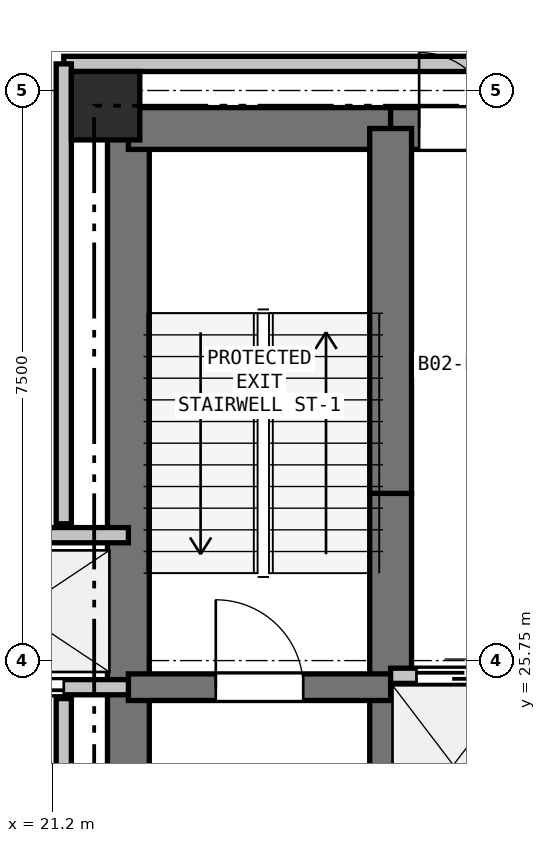
"""IFC4 building model, lengths in metres.
Left out: names, types, materials, properties, quantities, classifications, styles, units other than length and angle.
Written with IfcOpenShell. Run it as: python <this file> out.ifc"""

import sys

from ifc_helpers import new_model, si_unit, direction, frame, frame_2d, origin, origin_2d, place, context, subcontext, project, spatial, rectangle, extrude, element, fill, save


model = new_model("IFC4")
c1 = context("Model", 3, precision=1e-05, world=origin(), true_north=direction((0.0, 1.0)))
c2 = subcontext(c1, "Body", "Model", "MODEL_VIEW")
j1 = project(units=[si_unit("LENGTHUNIT", "METRE"), si_unit("PLANEANGLEUNIT", "RADIAN")], contexts=[c1])
p1 = place(None, origin())
s1 = spatial("IfcSite", under=j1, at=p1, CompositionType="ELEMENT")
p2 = place(p1, origin())
s2 = spatial("IfcBuilding", under=s1, at=p2, CompositionType="ELEMENT")
p3 = place(p2, frame((0.0, 0.0, -9.0)))
s3 = spatial("IfcBuildingStorey", under=s2, at=p3, CompositionType="ELEMENT", Elevation=-9.0)
p4 = place(p3, frame((21.9, 33.05, 0.0), z_axis=(0.0, 0.0, 1.0), x_axis=(1.0, 0.0, 0.0)))
e1 = element("IfcColumn", 1, at=p4, inside=s3, PredefinedType="COLUMN", context=c2, shape_type="SweptSolid", body=[
    extrude(rectangle(XDim=0.9, YDim=0.9, at=origin_2d()), origin(), (0.0, 0.0, 1.0), 4.5),
])
p5 = place(p3, frame((22.2, 20.75, 0.0), z_axis=(0.0, 0.0, 1.0), x_axis=(0.0, 1.0, 0.0)))
e2 = element("IfcWall", 2, at=p5, inside=s3, PredefinedType="SHEAR", context=c2, shape_type="SweptSolid", body=[
    extrude(rectangle(XDim=4.65, YDim=0.55, at=frame_2d((2.325, 0.0))), origin(), (0.0, 0.0, 1.0), 4.2),
])
p6 = place(p3, frame((22.2, 25.4, 0.0), z_axis=(0.0, 0.0, 1.0), x_axis=(0.0, 1.0, 0.0)))
e3 = element("IfcWall", 3, at=p6, inside=s3, PredefinedType="SHEAR", context=c2, shape_type="SweptSolid", body=[
    extrude(rectangle(XDim=7.35, YDim=0.55, at=frame_2d((3.675, 0.0))), origin(), (0.0, 0.0, 1.0), 4.2),
])
p7 = place(p3, frame((22.2, 32.75, 0.0), z_axis=(0.0, 0.0, 1.0), x_axis=(1.0, 0.0, 0.0)))
e4 = element("IfcWall", 4, at=p7, inside=s3, PredefinedType="SHEAR", context=c2, shape_type="SweptSolid", body=[
    extrude(rectangle(XDim=3.45, YDim=0.55, at=frame_2d((1.725, 0.0))), origin(), (0.0, 0.0, 1.0), 4.2),
])
p8 = place(p3, frame((25.65, 32.75, 0.0), z_axis=(0.0, 0.0, 1.0), x_axis=(1.0, 0.0, 0.0)))
e5 = element("IfcWall", 5, at=p8, inside=s3, PredefinedType="SHEAR", context=c2, shape_type="SweptSolid", body=[
    extrude(rectangle(XDim=1.75, YDim=0.55, at=frame_2d((0.875, 0.0))), origin(), (0.0, 0.0, 1.0), 4.2),
])
p9 = place(p8, frame((0.375, 0.0, 0.0)))
e6 = element("IfcOpeningElement", 6, at=p9, cuts=e5, PredefinedType="OPENING", context=c2, shape_type="SweptSolid", body=[
    extrude(rectangle(XDim=1.0, YDim=2.15, at=frame_2d((0.5, 1.075))), frame((0.0, 0.285, 0.0), z_axis=(0.0, -1.0, 0.0), x_axis=(1.0, 0.0, 0.0)), (0.0, 0.0, 1.0), 0.57),
])
p10 = place(p3, frame((25.65, 22.75, 0.0), z_axis=(0.0, 0.0, 1.0), x_axis=(0.0, 1.0, 0.0)))
e7 = element("IfcWall", 7, at=p10, inside=s3, PredefinedType="SHEAR", context=c2, shape_type="SweptSolid", body=[
    extrude(rectangle(XDim=2.8, YDim=0.55, at=frame_2d((1.4, 0.0))), origin(), (0.0, 0.0, 1.0), 4.2),
])
p11 = place(p3, frame((25.65, 25.55, 0.0), z_axis=(0.0, 0.0, 1.0), x_axis=(0.0, 1.0, 0.0)))
e8 = element("IfcWall", 8, at=p11, inside=s3, PredefinedType="SHEAR", context=c2, shape_type="SweptSolid", body=[
    extrude(rectangle(XDim=2.4, YDim=0.55, at=frame_2d((1.2, 0.0))), origin(), (0.0, 0.0, 1.0), 4.2),
])
p12 = place(p3, frame((25.65, 27.95, 0.0), z_axis=(0.0, 0.0, 1.0), x_axis=(0.0, 1.0, 0.0)))
e9 = element("IfcWall", 9, at=p12, inside=s3, PredefinedType="SHEAR", context=c2, shape_type="SweptSolid", body=[
    extrude(rectangle(XDim=4.8, YDim=0.55, at=frame_2d((2.4, 0.0))), origin(), (0.0, 0.0, 1.0), 4.2),
])
p13 = place(p3, frame((22.2, 25.4, 0.0), z_axis=(0.0, 0.0, 1.0), x_axis=(1.0, 0.0, 0.0)))
e10 = element("IfcWall", 10, at=p13, inside=s3, PredefinedType="SHEAR", context=c2, shape_type="SweptSolid", body=[
    extrude(rectangle(XDim=3.45, YDim=0.35, at=frame_2d((1.725, 0.0))), origin(), (0.0, 0.0, 1.0), 4.2),
])
p14 = place(p13, frame((1.15, 0.0, 0.0)))
e11 = element("IfcOpeningElement", 11, at=p14, cuts=e10, PredefinedType="OPENING", context=c2, shape_type="SweptSolid", body=[
    extrude(rectangle(XDim=1.15, YDim=2.15, at=frame_2d((0.575, 1.075))), frame((0.0, 0.185, 0.0), z_axis=(0.0, -1.0, 0.0), x_axis=(1.0, 0.0, 0.0)), (0.0, 0.0, 1.0), 0.37),
])
p15 = place(p3, frame((25.65, 25.55, 0.0), z_axis=(0.0, 0.0, 1.0), x_axis=(1.0, 0.0, 0.0)))
e12 = element("IfcWall", 12, at=p15, inside=s3, PredefinedType="PARTITIONING", context=c2, shape_type="SweptSolid", body=[
    extrude(rectangle(XDim=4.95, YDim=0.2, at=frame_2d((2.475, 0.0))), origin(), (0.0, 0.0, 1.0), 4.2),
])
p16 = place(p15, frame((0.34, 0.0, 0.0)))
e13 = element("IfcOpeningElement", 13, at=p16, cuts=e12, PredefinedType="OPENING", context=c2, shape_type="SweptSolid", body=[
    extrude(rectangle(XDim=1.1, YDim=2.15, at=frame_2d((0.55, 1.075))), frame((0.0, 0.11, 0.0), z_axis=(0.0, -1.0, 0.0), x_axis=(1.0, 0.0, 0.0)), (0.0, 0.0, 1.0), 0.22),
])
p17 = place(p15, frame((1.99, 0.0, 0.0)))
e14 = element("IfcOpeningElement", 14, at=p17, cuts=e12, PredefinedType="OPENING", context=c2, shape_type="SweptSolid", body=[
    extrude(rectangle(XDim=1.1, YDim=2.15, at=frame_2d((0.55, 1.075))), frame((0.0, 0.11, 0.0), z_axis=(0.0, -1.0, 0.0), x_axis=(1.0, 0.0, 0.0)), (0.0, 0.0, 1.0), 0.22),
])
p18 = place(p15, frame((3.64, 0.0, 0.0)))
e15 = element("IfcOpeningElement", 15, at=p18, cuts=e12, PredefinedType="OPENING", context=c2, shape_type="SweptSolid", body=[
    extrude(rectangle(XDim=1.1, YDim=2.15, at=frame_2d((0.55, 1.075))), frame((0.0, 0.11, 0.0), z_axis=(0.0, -1.0, 0.0), x_axis=(1.0, 0.0, 0.0)), (0.0, 0.0, 1.0), 0.22),
])
p19 = place(p3, frame((19.4, 27.4, 0.0), z_axis=(0.0, 0.0, 1.0), x_axis=(1.0, 0.0, 0.0)))
e16 = element("IfcWall", 16, at=p19, inside=s3, PredefinedType="PARTITIONING", context=c2, shape_type="SweptSolid", body=[
    extrude(rectangle(XDim=2.8, YDim=0.2, at=frame_2d((1.4, 0.0))), origin(), (0.0, 0.0, 1.0), 4.2),
])
p20 = place(p3, frame((22.2, 25.4, 0.0), z_axis=(0.0, 0.0, 1.0), x_axis=(-1.0, 0.0, 0.0)))
e17 = element("IfcWall", 17, at=p20, inside=s3, PredefinedType="PARTITIONING", context=c2, shape_type="SweptSolid", body=[
    extrude(rectangle(XDim=2.8, YDim=0.2, at=frame_2d((1.4, 0.0))), origin(), (0.0, 0.0, 1.0), 4.2),
])
p21 = place(p20, frame((0.85, 0.0, 0.0)))
e18 = element("IfcOpeningElement", 18, at=p21, cuts=e17, PredefinedType="OPENING", context=c2, shape_type="SweptSolid", body=[
    extrude(rectangle(XDim=1.3, YDim=2.2, at=frame_2d((0.65, 1.1))), frame((0.0, 0.11, 0.0), z_axis=(0.0, -1.0, 0.0), x_axis=(1.0, 0.0, 0.0)), (0.0, 0.0, 1.0), 0.22),
])
p22 = place(p3, frame((36.65, 33.6, 0.0), z_axis=(0.0, 0.0, 1.0), x_axis=(-1.0, 0.0, 0.0)))
e19 = element("IfcWall", 19, at=p22, inside=s3, PredefinedType="PARTITIONING", context=c2, shape_type="SweptSolid", body=[
    extrude(rectangle(XDim=15.3, YDim=0.2, at=frame_2d((7.65, 0.0))), origin(), (0.0, 0.0, 1.0), 4.2),
])
p23 = place(p3, frame((21.35, 33.6, 0.0), z_axis=(0.0, 0.0, 1.0), x_axis=(0.0, -1.0, 0.0)))
e20 = element("IfcWall", 20, at=p23, inside=s3, PredefinedType="PARTITIONING", context=c2, shape_type="SweptSolid", body=[
    extrude(rectangle(XDim=6.05, YDim=0.2, at=frame_2d((3.025, 0.0))), origin(), (0.0, 0.0, 1.0), 4.2),
])
p24 = place(p3, frame((21.35, 25.25, 0.0), z_axis=(0.0, 0.0, 1.0), x_axis=(0.0, -1.0, 0.0)))
e21 = element("IfcWall", 21, at=p24, inside=s3, PredefinedType="PARTITIONING", context=c2, shape_type="SweptSolid", body=[
    extrude(rectangle(XDim=5.35, YDim=0.2, at=frame_2d((2.675, 0.0))), origin(), (0.0, 0.0, 1.0), 4.2),
])
p25 = place(p16, origin())
e22 = element("IfcDoor", 22, at=p25, inside=s3, OperationType="SLIDING_TO_LEFT", PredefinedType="DOOR", context=c2, shape_type="SweptSolid", body=[
    extrude(rectangle(XDim=1.1, YDim=2.15, at=frame_2d((0.55, 1.075))), frame((0.0, 0.025, 0.0), z_axis=(0.0, -1.0, 0.0), x_axis=(1.0, 0.0, 0.0)), (0.0, 0.0, 1.0), 0.05),
])
fill(e13, e22)
p26 = place(p9, origin())
e23 = element("IfcDoor", 23, at=p26, inside=s3, OperationType="SINGLE_SWING_LEFT", PredefinedType="DOOR", context=c2, shape_type="SweptSolid", body=[
    extrude(rectangle(XDim=1.0, YDim=2.15, at=frame_2d((0.5, 1.075))), frame((0.0, 0.025, 0.0), z_axis=(0.0, -1.0, 0.0), x_axis=(1.0, 0.0, 0.0)), (0.0, 0.0, 1.0), 0.05),
])
fill(e6, e23)
p27 = place(p21, origin())
e24 = element("IfcDoor", 24, at=p27, inside=s3, OperationType="SLIDING_TO_LEFT", PredefinedType="DOOR", context=c2, shape_type="SweptSolid", body=[
    extrude(rectangle(XDim=1.3, YDim=2.2, at=frame_2d((0.65, 1.1))), frame((0.0, 0.025, 0.0), z_axis=(0.0, -1.0, 0.0), x_axis=(1.0, 0.0, 0.0)), (0.0, 0.0, 1.0), 0.05),
])
fill(e18, e24)
p28 = place(p14, origin())
e25 = element("IfcDoor", 25, at=p28, inside=s3, OperationType="SINGLE_SWING_LEFT", PredefinedType="DOOR", context=c2, shape_type="SweptSolid", body=[
    extrude(rectangle(XDim=1.15, YDim=2.15, at=frame_2d((0.575, 1.075))), frame((0.0, 0.025, 0.0), z_axis=(0.0, -1.0, 0.0), x_axis=(1.0, 0.0, 0.0)), (0.0, 0.0, 1.0), 0.05),
])
fill(e11, e25)
save(model, sys.argv[1])
